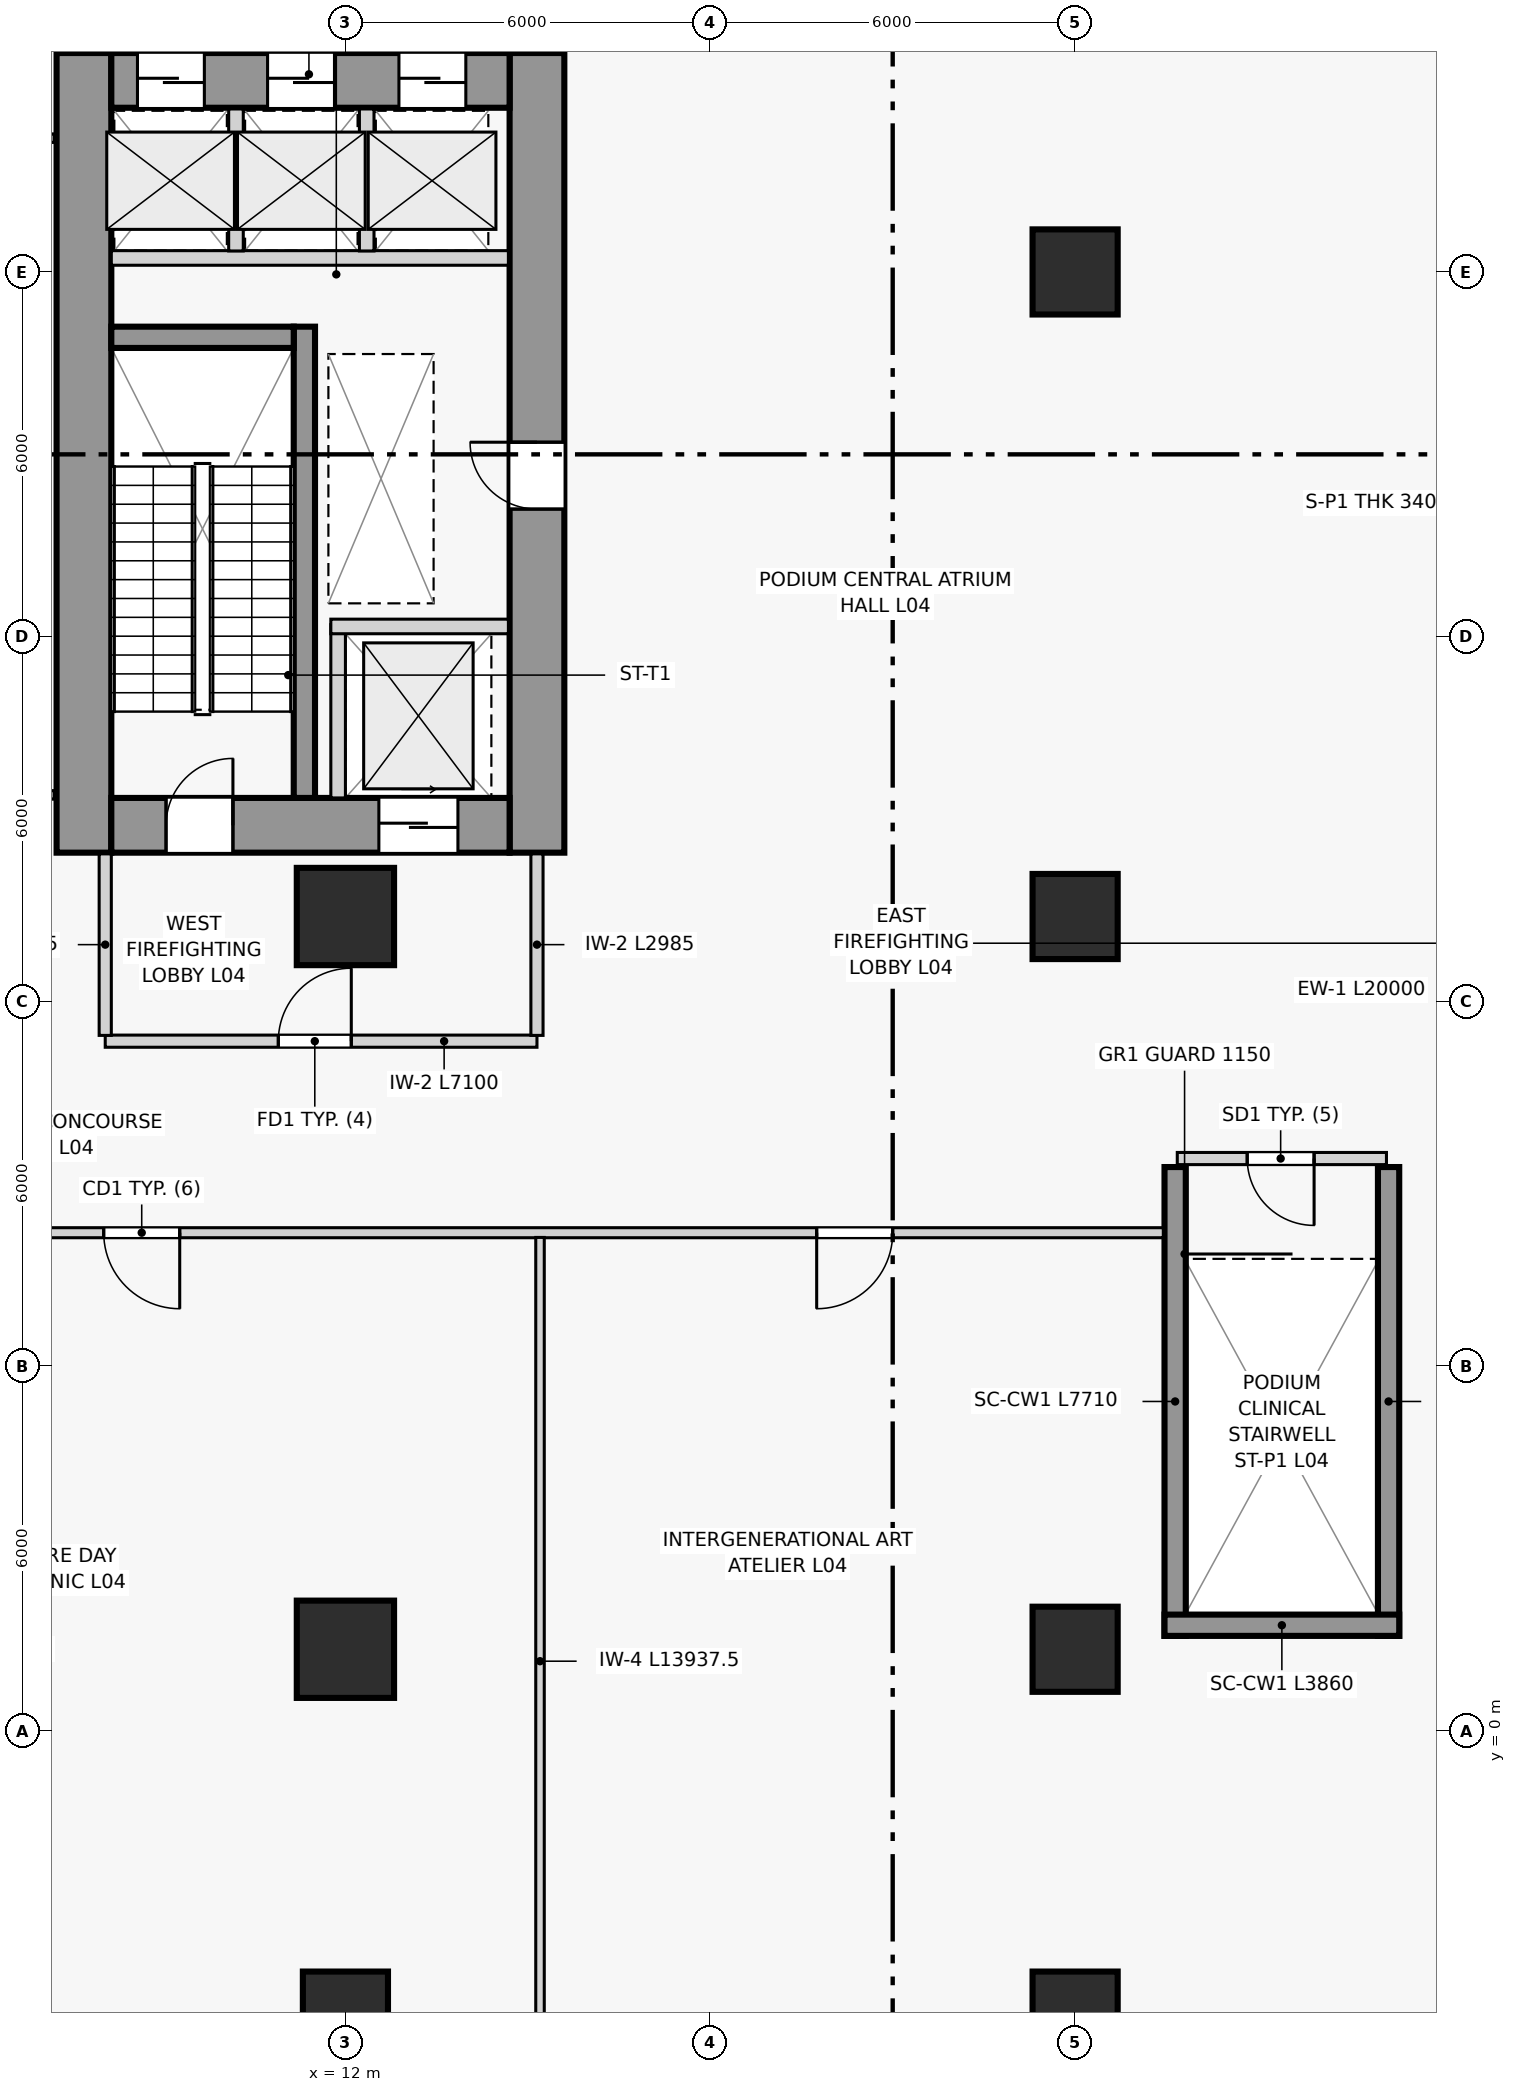
"""IFC4 building model, lengths in metres.
Left out: names, types, materials, properties, quantities, classifications, styles, units other than length and angle.
Written with IfcOpenShell. Run it as: python <this file> out.ifc"""

import sys

from ifc_helpers import new_model, si_unit, direction, frame, frame_2d, origin, origin_2d, place, context, subcontext, project, spatial, rectangle, extrude, source, transform, mapped, element, fill, save


model = new_model("IFC4")
c1 = context("Model", 3, precision=1e-05, world=origin(), true_north=direction((0.0, 1.0)))
c2 = subcontext(c1, "Body", "Model", "MODEL_VIEW")
j1 = project(units=[si_unit("LENGTHUNIT", "METRE"), si_unit("PLANEANGLEUNIT", "RADIAN")], contexts=[c1])
p1 = place(None, origin())
s1 = spatial("IfcSite", under=j1, at=p1, CompositionType="ELEMENT")
p2 = place(p1, origin())
s2 = spatial("IfcBuilding", under=s1, at=p2, CompositionType="ELEMENT")
p3 = place(p2, frame((0.0, 0.0, 18.0)))
s3 = spatial("IfcBuildingStorey", under=s2, at=p3, CompositionType="ELEMENT", Elevation=18.0)
p4 = place(p3, frame((7.7, 14.45, 0.0), z_axis=(0.0, 0.0, 1.0), x_axis=(0.0, 1.0, 0.0)))
e1 = element("IfcWall", 1, at=p4, inside=s3, PredefinedType="SHEAR", context=c2, shape_type="SweptSolid", body=[
    extrude(rectangle(XDim=13.15, YDim=0.9, at=frame_2d((6.575, 0.0))), origin(), (0.0, 0.0, 1.0), 4.5),
])
p5 = place(p3, frame((15.15, 14.45, 0.0), z_axis=(0.0, 0.0, 1.0), x_axis=(0.0, 1.0, 0.0)))
e2 = element("IfcWall", 2, at=p5, inside=s3, PredefinedType="SHEAR", context=c2, shape_type="SweptSolid", body=[
    extrude(rectangle(XDim=13.15, YDim=0.9, at=frame_2d((6.575, 0.0))), origin(), (0.0, 0.0, 1.0), 4.5),
])
p6 = place(p5, frame((5.65, 0.0, 0.0)))
e3 = element("IfcOpeningElement", 3, at=p6, cuts=e2, PredefinedType="OPENING", context=c2, shape_type="SweptSolid", body=[
    extrude(rectangle(XDim=1.1, YDim=2.2, at=frame_2d((0.55, 1.1))), frame((0.0, 0.46, 0.0), z_axis=(0.0, -1.0, 0.0), x_axis=(1.0, 0.0, 0.0)), (0.0, 0.0, 1.0), 0.92),
])
p7 = place(p3, frame((8.15, 14.9, 0.0), z_axis=(0.0, 0.0, 1.0), x_axis=(1.0, 0.0, 0.0)))
e4 = element("IfcWall", 4, at=p7, inside=s3, PredefinedType="SHEAR", context=c2, shape_type="SweptSolid", body=[
    extrude(rectangle(XDim=6.55, YDim=0.9, at=frame_2d((3.275, 0.0))), origin(), (0.0, 0.0, 1.0), 4.5),
])
p8 = place(p7, frame((0.9, 0.0, 0.0)))
e5 = element("IfcOpeningElement", 5, at=p8, cuts=e4, PredefinedType="OPENING", context=c2, shape_type="SweptSolid", body=[
    extrude(rectangle(XDim=1.1, YDim=2.2, at=frame_2d((0.55, 1.1))), frame((0.0, 0.46, 0.0), z_axis=(0.0, -1.0, 0.0), x_axis=(1.0, 0.0, 0.0)), (0.0, 0.0, 1.0), 0.92),
])
p9 = place(p7, frame((4.4, 0.0, 0.0)))
e6 = element("IfcOpeningElement", 6, at=p9, cuts=e4, PredefinedType="OPENING", context=c2, shape_type="SweptSolid", body=[
    extrude(rectangle(XDim=1.3, YDim=2.2, at=frame_2d((0.65, 1.1))), frame((0.0, 0.46, 0.0), z_axis=(0.0, -1.0, 0.0), x_axis=(1.0, 0.0, 0.0)), (0.0, 0.0, 1.0), 0.92),
])
p10 = place(p3, frame((8.15, 27.15, 0.0), z_axis=(0.0, 0.0, 1.0), x_axis=(1.0, 0.0, 0.0)))
e7 = element("IfcWall", 7, at=p10, inside=s3, PredefinedType="SHEAR", context=c2, shape_type="SweptSolid", body=[
    extrude(rectangle(XDim=6.55, YDim=0.9, at=frame_2d((3.275, 0.0))), origin(), (0.0, 0.0, 1.0), 4.5),
])
p11 = place(p10, frame((0.43, 0.0, 0.0)))
e8 = element("IfcOpeningElement", 8, at=p11, cuts=e7, PredefinedType="OPENING", context=c2, shape_type="SweptSolid", body=[
    extrude(rectangle(XDim=1.1, YDim=2.2, at=frame_2d((0.55, 1.1))), frame((0.0, 0.46, 0.0), z_axis=(0.0, -1.0, 0.0), x_axis=(1.0, 0.0, 0.0)), (0.0, 0.0, 1.0), 0.92),
])
p12 = place(p10, frame((2.57, 0.0, 0.0)))
e9 = element("IfcOpeningElement", 9, at=p12, cuts=e7, PredefinedType="OPENING", context=c2, shape_type="SweptSolid", body=[
    extrude(rectangle(XDim=1.1, YDim=2.2, at=frame_2d((0.55, 1.1))), frame((0.0, 0.46, 0.0), z_axis=(0.0, -1.0, 0.0), x_axis=(1.0, 0.0, 0.0)), (0.0, 0.0, 1.0), 0.92),
])
p13 = place(p10, frame((4.73, 0.0, 0.0)))
e10 = element("IfcOpeningElement", 10, at=p13, cuts=e7, PredefinedType="OPENING", context=c2, shape_type="SweptSolid", body=[
    extrude(rectangle(XDim=1.1, YDim=2.2, at=frame_2d((0.55, 1.1))), frame((0.0, 0.46, 0.0), z_axis=(0.0, -1.0, 0.0), x_axis=(1.0, 0.0, 0.0)), (0.0, 0.0, 1.0), 0.92),
])
p14 = place(p3, frame((11.325, 15.35, 0.0), z_axis=(0.0, 0.0, 1.0), x_axis=(0.0, 1.0, 0.0)))
e11 = element("IfcWall", 11, at=p14, inside=s3, PredefinedType="SHEAR", context=c2, shape_type="SweptSolid", body=[
    extrude(rectangle(XDim=7.75, YDim=0.35, at=frame_2d((3.875, 0.0))), origin(), (0.0, 0.0, 1.0), 4.5),
])
p15 = place(p3, frame((8.15, 22.925, 0.0), z_axis=(0.0, 0.0, 1.0), x_axis=(1.0, 0.0, 0.0)))
e12 = element("IfcWall", 12, at=p15, inside=s3, PredefinedType="SHEAR", context=c2, shape_type="SweptSolid", body=[
    extrude(rectangle(XDim=3.0, YDim=0.35, at=frame_2d((1.5, 0.0))), origin(), (0.0, 0.0, 1.0), 4.5),
])
for number, where, z_axis, x_axis in (
    (13, (25.645, 1.57, 0.0), (0.0, 0.0, 1.0), (0.0, 1.0, 0.0)),
    (14, (29.155, 1.57, 0.0), (0.0, 0.0, 1.0), (0.0, 1.0, 0.0)),
):
    element("IfcWall", number, at=place(p3, frame(where, z_axis=z_axis, x_axis=x_axis)), inside=s3, PredefinedType="SHEAR", context=c2, shape_type="SweptSolid", body=[
        extrude(rectangle(XDim=7.71, YDim=0.35, at=frame_2d((3.855, 0.0))), origin(), (0.0, 0.0, 1.0), 4.5),
    ])
p16 = place(p3, frame((25.47, 1.745, 0.0), z_axis=(0.0, 0.0, 1.0), x_axis=(1.0, 0.0, 0.0)))
e15 = element("IfcWall", 15, at=p16, inside=s3, PredefinedType="SHEAR", context=c2, shape_type="SweptSolid", body=[
    extrude(rectangle(XDim=3.86, YDim=0.35, at=frame_2d((1.93, 0.0))), origin(), (0.0, 0.0, 1.0), 4.5),
])
m1 = source(origin(), c2, "Body", "SweptSolid", [
    extrude(rectangle(XDim=1.4, YDim=1.4, at=origin_2d()), origin(), (0.0, 0.0, 1.0), 4.5),
])
p17 = place(p3, frame((12.0, -4.65, 0.0), z_axis=(0.0, 0.0, 1.0), x_axis=(1.0, 0.0, 0.0)))
e16 = element("IfcColumn", 16, at=p17, inside=s3, PredefinedType="COLUMN", context=c2, shape_type="MappedRepresentation", body=[
    mapped(m1, transform((0.0, 0.0, 0.0), scale=1.0)),
])
m2 = source(origin(), c2, "Body", "SweptSolid", [
    extrude(rectangle(XDim=1.6, YDim=1.6, at=origin_2d()), origin(), (0.0, 0.0, 1.0), 4.5),
])
for number, where, z_axis, x_axis in (
    (17, (12.0, 1.35, 0.0), (0.0, 0.0, 1.0), (1.0, 0.0, 0.0)),
    (18, (12.0, 13.4, 0.0), (0.0, 0.0, 1.0), (1.0, 0.0, 0.0)),
):
    element("IfcColumn", number, at=place(p3, frame(where, z_axis=z_axis, x_axis=x_axis)), inside=s3, PredefinedType="COLUMN", context=c2, shape_type="MappedRepresentation", body=[
        mapped(m2, transform((0.0, 0.0, 0.0), scale=1.0)),
    ])
for number, where, z_axis, x_axis in (
    (19, (24.0, -4.65, 0.0), (0.0, 0.0, 1.0), (1.0, 0.0, 0.0)),
    (20, (24.0, 1.35, 0.0), (0.0, 0.0, 1.0), (1.0, 0.0, 0.0)),
    (21, (24.0, 13.4, 0.0), (0.0, 0.0, 1.0), (1.0, 0.0, 0.0)),
    (22, (24.0, 24.0, 0.0), (0.0, 0.0, 1.0), (1.0, 0.0, 0.0)),
):
    element("IfcColumn", number, at=place(p3, frame(where, z_axis=z_axis, x_axis=x_axis)), inside=s3, PredefinedType="COLUMN", context=c2, shape_type="MappedRepresentation", body=[
        mapped(m1, transform((0.0, 0.0, 0.0), scale=1.0)),
    ])
p18 = place(p3, frame((11.88, 15.35, 0.0), z_axis=(0.0, 0.0, 1.0), x_axis=(0.0, 1.0, 0.0)))
e23 = element("IfcWall", 23, at=p18, inside=s3, PredefinedType="PARTITIONING", context=c2, shape_type="SweptSolid", body=[
    extrude(rectangle(XDim=2.85, YDim=0.24, at=frame_2d((1.425, 0.0))), origin(), (0.0, 0.0, 1.0), 3.85),
])
p19 = place(p3, frame((11.76, 18.17, 0.0), z_axis=(0.0, 0.0, 1.0), x_axis=(1.0, 0.0, 0.0)))
e24 = element("IfcWall", 24, at=p19, inside=s3, PredefinedType="PARTITIONING", context=c2, shape_type="SweptSolid", body=[
    extrude(rectangle(XDim=2.92, YDim=0.24, at=frame_2d((1.46, 0.0))), origin(), (0.0, 0.0, 1.0), 3.85),
])
p20 = place(p3, frame((8.05, 11.35, 0.0), z_axis=(0.0, 0.0, 1.0), x_axis=(1.0, 0.0, 0.0)))
e25 = element("IfcWall", 25, at=p20, inside=s3, PredefinedType="PARTITIONING", context=c2, shape_type="SweptSolid", body=[
    extrude(rectangle(XDim=7.1, YDim=0.2, at=frame_2d((3.55, 0.0))), origin(), (0.0, 0.0, 1.0), 3.85),
])
p21 = place(p20, frame((2.846, 0.0, 0.0)))
e26 = element("IfcOpeningElement", 26, at=p21, cuts=e25, PredefinedType="OPENING", context=c2, shape_type="SweptSolid", body=[
    extrude(rectangle(XDim=1.2, YDim=2.2, at=frame_2d((0.6, 1.1))), frame((0.0, 0.11, 0.0), z_axis=(0.0, -1.0, 0.0), x_axis=(1.0, 0.0, 0.0)), (0.0, 0.0, 1.0), 0.22),
])
for number, where, z_axis, x_axis in (
    (27, (8.05, 11.445, 0.0), (0.0, 0.0, 1.0), (0.0, 1.0, 0.0)),
    (28, (15.15, 11.445, 0.0), (0.0, 0.0, 1.0), (0.0, 1.0, 0.0)),
):
    element("IfcWall", number, at=place(p3, frame(where, z_axis=z_axis, x_axis=x_axis)), inside=s3, PredefinedType="PARTITIONING", context=c2, shape_type="SweptSolid", body=[
        extrude(rectangle(XDim=2.985, YDim=0.2, at=frame_2d((1.492, 0.0))), origin(), (0.0, 0.0, 1.0), 3.85),
    ])
p22 = place(p3, frame((8.15, 24.23, 0.0), z_axis=(0.0, 0.0, 1.0), x_axis=(1.0, 0.0, 0.0)))
e29 = element("IfcWall", 29, at=p22, inside=s3, PredefinedType="PARTITIONING", context=c2, shape_type="SweptSolid", body=[
    extrude(rectangle(XDim=6.53, YDim=0.24, at=frame_2d((3.265, 0.0))), origin(), (0.0, 0.0, 1.0), 3.85),
])
for number, where, z_axis, x_axis in (
    (30, (10.2, 24.345, 0.0), (0.0, 0.0, 1.0), (0.0, 1.0, 0.0)),
    (31, (12.35, 24.345, 0.0), (0.0, 0.0, 1.0), (0.0, 1.0, 0.0)),
):
    element("IfcWall", number, at=place(p3, frame(where, z_axis=z_axis, x_axis=x_axis)), inside=s3, PredefinedType="PARTITIONING", context=c2, shape_type="SweptSolid", body=[
        extrude(rectangle(XDim=2.335, YDim=0.24, at=frame_2d((1.167, 0.0))), origin(), (0.0, 0.0, 1.0), 3.85),
    ])
for number, where, z_axis, x_axis in (
    (32, (5.528, 15.4, 0.0), (0.0, 0.0, 1.0), (1.0, 0.0, 0.0)),
    (33, (5.528, 26.2, 0.0), (0.0, 0.0, 1.0), (1.0, 0.0, 0.0)),
):
    element("IfcWall", number, at=place(p3, frame(where, z_axis=z_axis, x_axis=x_axis)), inside=s3, PredefinedType="PARTITIONING", context=c2, shape_type="SweptSolid", body=[
        extrude(rectangle(XDim=1.682, YDim=0.14, at=frame_2d((0.841, 0.0))), origin(), (0.0, 0.0, 1.0), 3.85),
    ])
p23 = place(p3, frame((25.68, 9.42, 0.0), z_axis=(0.0, 0.0, 1.0), x_axis=(1.0, 0.0, 0.0)))
e34 = element("IfcWall", 34, at=p23, inside=s3, PredefinedType="PARTITIONING", context=c2, shape_type="SweptSolid", body=[
    extrude(rectangle(XDim=3.44, YDim=0.2, at=frame_2d((1.72, 0.0))), origin(), (0.0, 0.0, 1.0), 3.85),
])
p24 = place(p23, frame((1.15, 0.0, 0.0)))
e35 = element("IfcOpeningElement", 35, at=p24, cuts=e34, PredefinedType="OPENING", context=c2, shape_type="SweptSolid", body=[
    extrude(rectangle(XDim=1.1, YDim=2.2, at=frame_2d((0.55, 1.1))), frame((0.0, 0.11, 0.0), z_axis=(0.0, -1.0, 0.0), x_axis=(1.0, 0.0, 0.0)), (0.0, 0.0, 1.0), 0.22),
])
p25 = place(p3, frame((0.185, 8.2, 0.0), z_axis=(0.0, 0.0, 1.0), x_axis=(1.0, 0.0, 0.0)))
e36 = element("IfcWall", 36, at=p25, inside=s3, PredefinedType="PARTITIONING", context=c2, shape_type="SweptSolid", body=[
    extrude(rectangle(XDim=25.265, YDim=0.165, at=frame_2d((12.632, 0.0))), origin(), (0.0, 0.0, 1.0), 3.85),
])
p26 = place(p25, frame((7.84, 0.0, 0.0)))
e37 = element("IfcOpeningElement", 37, at=p26, cuts=e36, PredefinedType="OPENING", context=c2, shape_type="SweptSolid", body=[
    extrude(rectangle(XDim=1.25, YDim=2.2, at=frame_2d((0.625, 1.1))), frame((0.0, 0.093, 0.0), z_axis=(0.0, -1.0, 0.0), x_axis=(1.0, 0.0, 0.0)), (0.0, 0.0, 1.0), 0.185),
])
p27 = place(p25, frame((19.565, 0.0, 0.0)))
e38 = element("IfcOpeningElement", 38, at=p27, cuts=e36, PredefinedType="OPENING", context=c2, shape_type="SweptSolid", body=[
    extrude(rectangle(XDim=1.25, YDim=2.2, at=frame_2d((0.625, 1.1))), frame((0.0, 0.093, 0.0), z_axis=(0.0, -1.0, 0.0), x_axis=(1.0, 0.0, 0.0)), (0.0, 0.0, 1.0), 0.185),
])
p28 = place(p3, frame((15.2, -5.815, 0.0), z_axis=(0.0, 0.0, 1.0), x_axis=(0.0, 1.0, 0.0)))
e39 = element("IfcWall", 39, at=p28, inside=s3, PredefinedType="PARTITIONING", context=c2, shape_type="SweptSolid", body=[
    extrude(rectangle(XDim=13.938, YDim=0.14, at=frame_2d((6.969, 0.0))), origin(), (0.0, 0.0, 1.0), 3.85),
])
m3 = source(origin(), c2, "Body", "SweptSolid", [
    extrude(rectangle(XDim=1.1, YDim=2.2, at=frame_2d((0.55, 1.1))), frame((0.0, 0.025, 0.0), z_axis=(0.0, -1.0, 0.0), x_axis=(1.0, 0.0, 0.0)), (0.0, 0.0, 1.0), 0.05),
])
p29 = place(p8, origin())
e40 = element("IfcDoor", 40, at=p29, inside=s3, OperationType="SINGLE_SWING_RIGHT", PredefinedType="DOOR", context=c2, shape_type="MappedRepresentation", body=[
    mapped(m3, transform((0.0, 0.0, 0.0), scale=1.0)),
])
fill(e5, e40)
m4 = source(origin(), c2, "Body", "SweptSolid", [
    extrude(rectangle(XDim=1.3, YDim=2.2, at=frame_2d((0.65, 1.1))), frame((0.0, 0.025, 0.0), z_axis=(0.0, -1.0, 0.0), x_axis=(1.0, 0.0, 0.0)), (0.0, 0.0, 1.0), 0.05),
])
p30 = place(p9, origin())
e41 = element("IfcDoor", 41, at=p30, inside=s3, OperationType="SLIDING_TO_RIGHT", PredefinedType="DOOR", context=c2, shape_type="MappedRepresentation", body=[
    mapped(m4, transform((0.0, 0.0, 0.0), scale=1.0)),
])
fill(e6, e41)
m5 = source(origin(), c2, "Body", "SweptSolid", [
    extrude(rectangle(XDim=1.2, YDim=2.2, at=frame_2d((0.6, 1.1))), frame((0.0, 0.025, 0.0), z_axis=(0.0, -1.0, 0.0), x_axis=(1.0, 0.0, 0.0)), (0.0, 0.0, 1.0), 0.05),
])
p31 = place(p21, origin())
e42 = element("IfcDoor", 42, at=p31, inside=s3, OperationType="SINGLE_SWING_RIGHT", PredefinedType="DOOR", context=c2, shape_type="MappedRepresentation", body=[
    mapped(m5, transform((0.0, 0.0, 0.0), scale=1.0)),
])
fill(e26, e42)
m6 = source(origin(), c2, "Body", "SweptSolid", [
    extrude(rectangle(XDim=1.1, YDim=2.2, at=frame_2d((0.55, 1.1))), frame((0.0, 0.025, 0.0), z_axis=(0.0, -1.0, 0.0), x_axis=(1.0, 0.0, 0.0)), (0.0, 0.0, 1.0), 0.05),
])
p32 = place(p11, origin())
e43 = element("IfcDoor", 43, at=p32, inside=s3, OperationType="SLIDING_TO_LEFT", PredefinedType="DOOR", context=c2, shape_type="MappedRepresentation", body=[
    mapped(m6, transform((0.0, 0.0, 0.0), scale=1.0)),
])
fill(e8, e43)
p33 = place(p12, origin())
e44 = element("IfcDoor", 44, at=p33, inside=s3, OperationType="SLIDING_TO_LEFT", PredefinedType="DOOR", context=c2, shape_type="MappedRepresentation", body=[
    mapped(m6, transform((0.0, 0.0, 0.0), scale=1.0)),
])
fill(e9, e44)
p34 = place(p13, origin())
e45 = element("IfcDoor", 45, at=p34, inside=s3, OperationType="SLIDING_TO_LEFT", PredefinedType="DOOR", context=c2, shape_type="MappedRepresentation", body=[
    mapped(m6, transform((0.0, 0.0, 0.0), scale=1.0)),
])
fill(e10, e45)
p35 = place(p6, origin())
e46 = element("IfcDoor", 46, at=p35, inside=s3, OperationType="SINGLE_SWING_RIGHT", PredefinedType="DOOR", context=c2, shape_type="MappedRepresentation", body=[
    mapped(m3, transform((0.0, 0.0, 0.0), scale=1.0)),
])
fill(e3, e46)
p36 = place(p24, frame((1.1, 0.0, 0.0), z_axis=(0.0, 0.0, 1.0), x_axis=(-1.0, 0.0, 0.0)))
e47 = element("IfcDoor", 47, at=p36, inside=s3, OperationType="SINGLE_SWING_LEFT", PredefinedType="DOOR", context=c2, shape_type="MappedRepresentation", body=[
    mapped(m3, transform((0.0, 0.0, 0.0), scale=1.0)),
])
fill(e35, e47)
m7 = source(origin(), c2, "Body", "SweptSolid", [
    extrude(rectangle(XDim=1.25, YDim=2.2, at=frame_2d((0.625, 1.1))), frame((0.0, 0.025, 0.0), z_axis=(0.0, -1.0, 0.0), x_axis=(1.0, 0.0, 0.0)), (0.0, 0.0, 1.0), 0.05),
])
p37 = place(p26, frame((1.25, 0.0, 0.0), z_axis=(0.0, 0.0, 1.0), x_axis=(-1.0, 0.0, 0.0)))
e48 = element("IfcDoor", 48, at=p37, inside=s3, OperationType="SINGLE_SWING_LEFT", PredefinedType="DOOR", context=c2, shape_type="MappedRepresentation", body=[
    mapped(m7, transform((0.0, 0.0, 0.0), scale=1.0)),
])
fill(e37, e48)
p38 = place(p27, frame((1.25, 0.0, 0.0), z_axis=(0.0, 0.0, 1.0), x_axis=(-1.0, 0.0, 0.0)))
e49 = element("IfcDoor", 49, at=p38, inside=s3, OperationType="SINGLE_SWING_RIGHT", PredefinedType="DOOR", context=c2, shape_type="MappedRepresentation", body=[
    mapped(m7, transform((0.0, 0.0, 0.0), scale=1.0)),
])
fill(e38, e49)
save(model, sys.argv[1])
